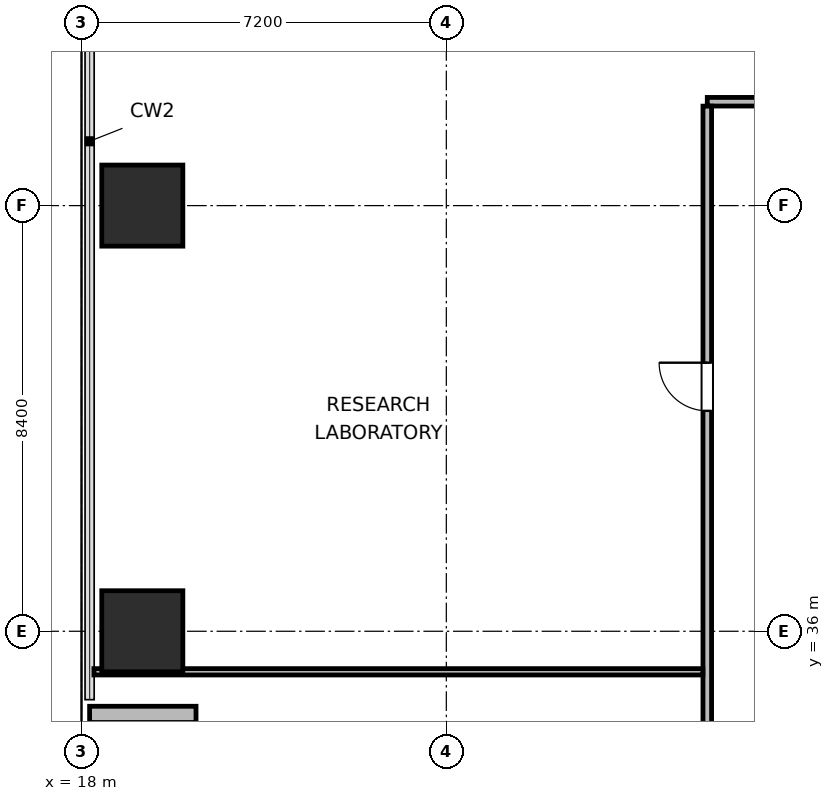
"""IFC4 building model, lengths in metres.
Left out: names, types, materials, properties, quantities, classifications, styles, units other than length and angle.
Written with IfcOpenShell. Run it as: python <this file> out.ifc"""

import sys

from ifc_helpers import new_model, si_unit, direction, frame, frame_2d, origin, origin_2d, place, context, subcontext, project, spatial, rectangle, extrude, element, fill, save


model = new_model("IFC4")
c1 = context("Model", 3, precision=1e-05, world=origin(), true_north=direction((0.0, 1.0)))
c2 = subcontext(c1, "Body", "Model", "MODEL_VIEW")
j1 = project(units=[si_unit("LENGTHUNIT", "METRE"), si_unit("PLANEANGLEUNIT", "RADIAN")], contexts=[c1])
p1 = place(None, origin())
s1 = spatial("IfcSite", under=j1, at=p1, CompositionType="ELEMENT")
p2 = place(p1, origin())
s2 = spatial("IfcBuilding", under=s1, at=p2, CompositionType="ELEMENT")
p3 = place(p2, frame((0.0, 0.0, 29.4)))
s3 = spatial("IfcBuildingStorey", under=s2, at=p3, CompositionType="ELEMENT", Elevation=29.4)
for number, where, z_axis, x_axis in (
    (1, (19.2, 36.0, 0.0), (0.0, 0.0, 1.0), (1.0, 0.0, 0.0)),
    (2, (19.2, 44.4, 0.0), (0.0, 0.0, 1.0), (1.0, 0.0, 0.0)),
):
    element("IfcColumn", number, at=place(p3, frame(where, z_axis=z_axis, x_axis=x_axis)), inside=s3, PredefinedType="COLUMN", context=c2, shape_type="SweptSolid", body=[
        extrude(rectangle(XDim=1.6, YDim=1.6, at=origin_2d()), origin(), (0.0, 0.0, 1.0), 3.9),
    ])
p4 = place(p3, frame((20.26, 34.36, 0.0), z_axis=(0.0, 0.0, 1.0), x_axis=(-1.0, 0.0, 0.0)))
e3 = element("IfcWall", 3, at=p4, inside=s3, PredefinedType="SOLIDWALL", context=c2, shape_type="SweptSolid", body=[
    extrude(rectangle(XDim=2.1, YDim=0.32, at=frame_2d((1.05, 0.0))), origin(), (0.0, 0.0, 1.0), 2.875),
])
p5 = place(p3, frame((30.35, 46.45, 0.0), z_axis=(0.0, 0.0, 1.0), x_axis=(1.0, 0.0, 0.0)))
e4 = element("IfcWall", 4, at=p5, inside=s3, PredefinedType="PARTITIONING", context=c2, shape_type="SweptSolid", body=[
    extrude(rectangle(XDim=35.3, YDim=0.17, at=frame_2d((17.65, 0.0))), origin(), (0.0, 0.0, 1.0), 3.64),
])
p6 = place(p5, frame((6.21, 0.0, 0.0)))
e5 = element("IfcOpeningElement", 5, at=p6, cuts=e4, PredefinedType="OPENING", context=c2, shape_type="SweptSolid", body=[
    extrude(rectangle(XDim=0.95, YDim=2.04, at=frame_2d((0.475, 1.02))), frame((0.0, 0.095, 0.0), z_axis=(0.0, -1.0, 0.0), x_axis=(1.0, 0.0, 0.0)), (0.0, 0.0, 1.0), 0.19),
])
p7 = place(p5, frame((15.38, 0.0, 0.0)))
e6 = element("IfcOpeningElement", 6, at=p7, cuts=e4, PredefinedType="OPENING", context=c2, shape_type="SweptSolid", body=[
    extrude(rectangle(XDim=0.95, YDim=2.04, at=frame_2d((0.475, 1.02))), frame((0.0, 0.095, 0.0), z_axis=(0.0, -1.0, 0.0), x_axis=(1.0, 0.0, 0.0)), (0.0, 0.0, 1.0), 0.19),
])
p8 = place(p5, frame((26.345, 0.0, 0.0)))
e7 = element("IfcOpeningElement", 7, at=p8, cuts=e4, PredefinedType="OPENING", context=c2, shape_type="SweptSolid", body=[
    extrude(rectangle(XDim=0.95, YDim=2.04, at=frame_2d((0.475, 1.02))), frame((0.0, 0.095, 0.0), z_axis=(0.0, -1.0, 0.0), x_axis=(1.0, 0.0, 0.0)), (0.0, 0.0, 1.0), 0.19),
])
p9 = place(p3, frame((30.35, 25.637, 0.0), z_axis=(0.0, 0.0, 1.0), x_axis=(0.0, 1.0, 0.0)))
e8 = element("IfcWall", 8, at=p9, inside=s3, PredefinedType="PARTITIONING", context=c2, shape_type="SweptSolid", body=[
    extrude(rectangle(XDim=20.726, YDim=0.17, at=frame_2d((10.363, 0.0))), origin(), (0.0, 0.0, 1.0), 3.64),
])
p10 = place(p9, frame((4.263, 0.0, 0.0)))
e9 = element("IfcOpeningElement", 9, at=p10, cuts=e8, PredefinedType="OPENING", context=c2, shape_type="SweptSolid", body=[
    extrude(rectangle(XDim=0.95, YDim=2.04, at=frame_2d((0.475, 1.02))), frame((0.0, 0.095, 0.0), z_axis=(0.0, -1.0, 0.0), x_axis=(1.0, 0.0, 0.0)), (0.0, 0.0, 1.0), 0.19),
])
p11 = place(p9, frame((14.713, 0.0, 0.0)))
e10 = element("IfcOpeningElement", 10, at=p11, cuts=e8, PredefinedType="OPENING", context=c2, shape_type="SweptSolid", body=[
    extrude(rectangle(XDim=0.95, YDim=2.04, at=frame_2d((0.475, 1.02))), frame((0.0, 0.095, 0.0), z_axis=(0.0, -1.0, 0.0), x_axis=(1.0, 0.0, 0.0)), (0.0, 0.0, 1.0), 0.19),
])
p12 = place(p3, frame((18.245, 35.2, 0.0), z_axis=(0.0, 0.0, 1.0), x_axis=(1.0, 0.0, 0.0)))
e11 = element("IfcWall", 11, at=p12, inside=s3, PredefinedType="PARTITIONING", context=c2, shape_type="SweptSolid", body=[
    extrude(rectangle(XDim=12.018, YDim=0.125, at=frame_2d((6.009, 0.0))), origin(), (0.0, 0.0, 1.0), 3.64),
])
p13 = place(p11, origin())
e12 = element("IfcDoor", 12, at=p13, inside=s3, OperationType="SINGLE_SWING_RIGHT", PredefinedType="DOOR", context=c2, shape_type="SweptSolid", body=[
    extrude(rectangle(XDim=0.95, YDim=2.04, at=frame_2d((0.475, 1.02))), frame((0.0, 0.025, 0.0), z_axis=(0.0, -1.0, 0.0), x_axis=(1.0, 0.0, 0.0)), (0.0, 0.0, 1.0), 0.05),
])
fill(e10, e12)
save(model, sys.argv[1])
